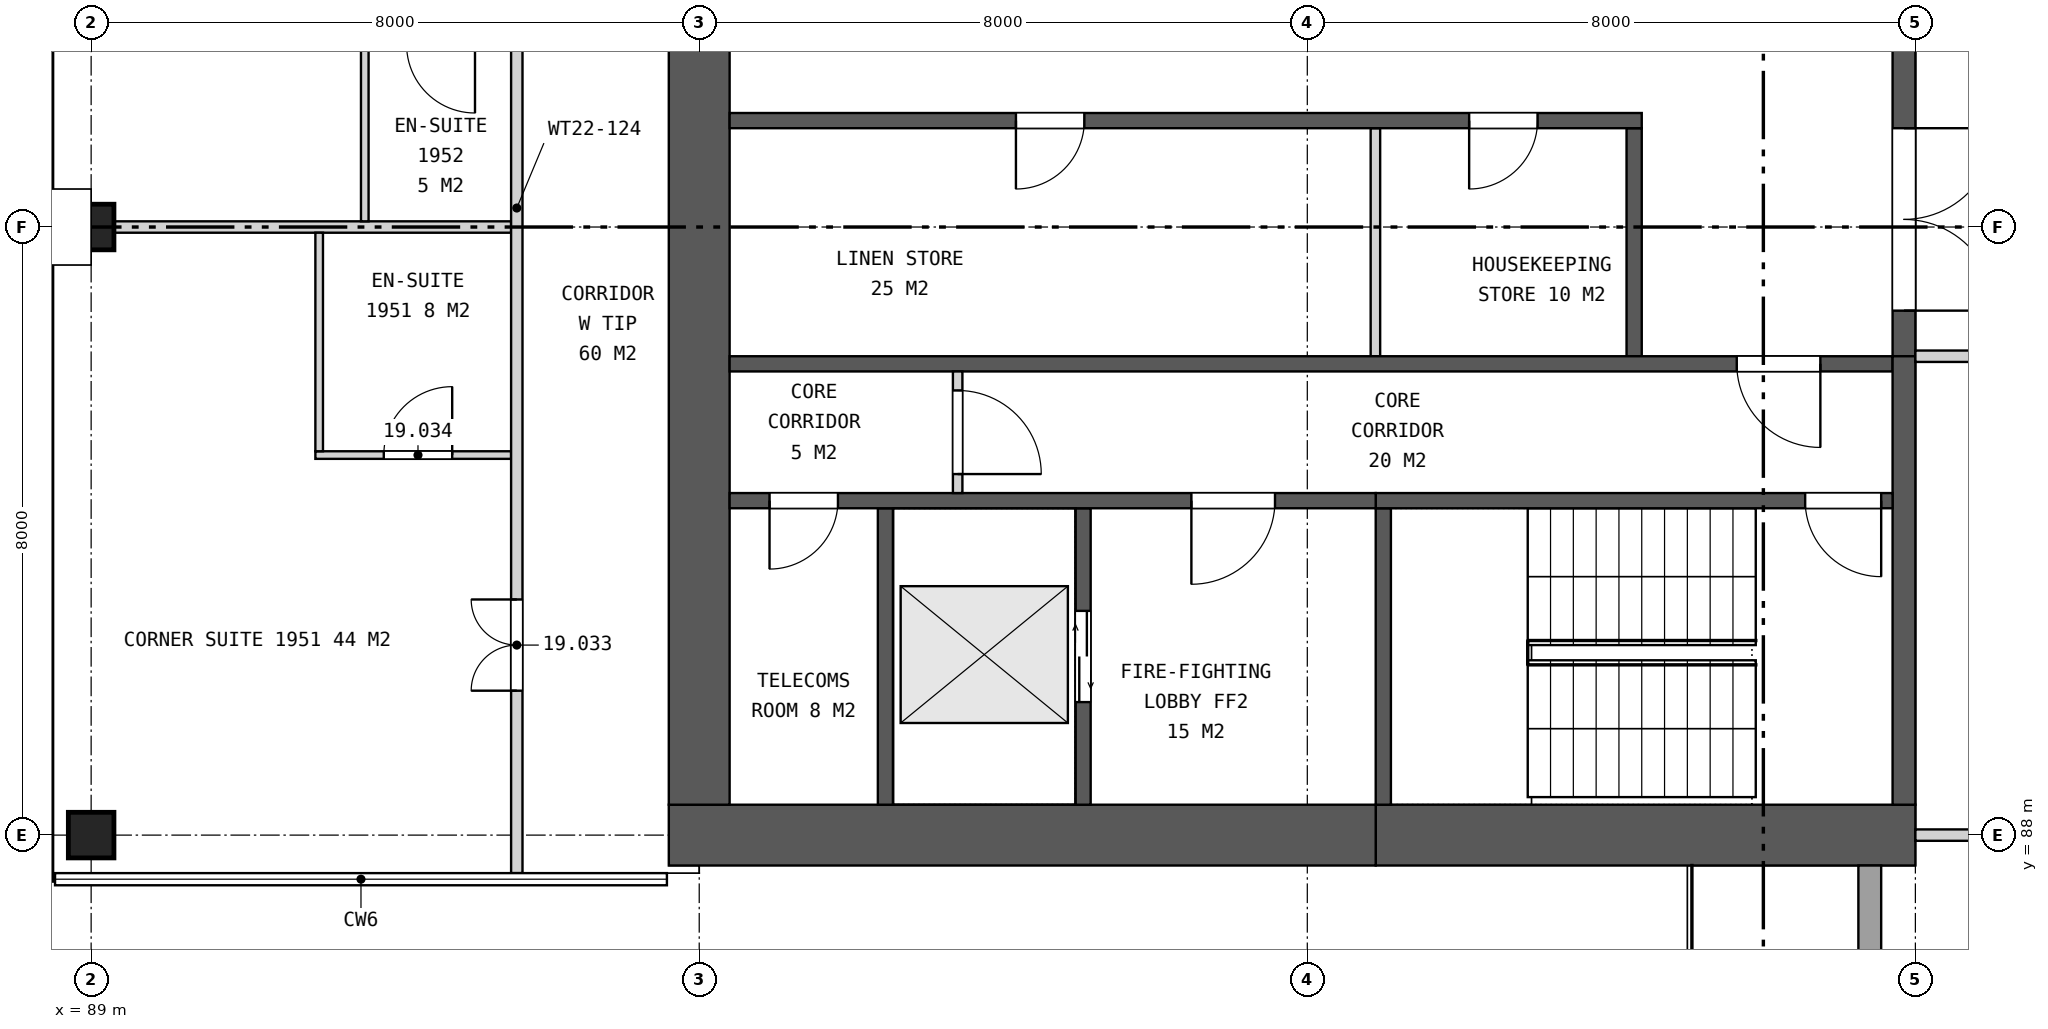
"""IFC4 building model, lengths in metres.
Left out: names, types, materials, properties, quantities, classifications, styles, units other than length and angle.
Written with IfcOpenShell. Run it as: python <this file> out.ifc"""

import sys

from ifc_helpers import new_model, si_unit, direction, frame, frame_2d, origin, origin_2d, place, context, subcontext, project, spatial, rectangle, extrude, element, fill, save


model = new_model("IFC4")
c1 = context("Model", 3, precision=1e-05, world=origin(), true_north=direction((0.0, 1.0)))
c2 = subcontext(c1, "Body", "Model", "MODEL_VIEW")
j1 = project(units=[si_unit("LENGTHUNIT", "METRE"), si_unit("PLANEANGLEUNIT", "RADIAN")], contexts=[c1])
p1 = place(None, origin())
s1 = spatial("IfcSite", under=j1, at=p1, CompositionType="ELEMENT")
p2 = place(p1, origin())
s2 = spatial("IfcBuilding", under=s1, at=p2, CompositionType="ELEMENT")
p3 = place(p2, frame((0.0, 0.0, 97.9)))
s3 = spatial("IfcBuildingStorey", under=s2, at=p3, CompositionType="ELEMENT", Elevation=97.9)
for number, where, z_axis, x_axis in (
    (1, (89.0, 88.0, 0.0), (0.0, 0.0, 1.0), (1.0, 0.0, 0.0)),
    (2, (89.0, 96.0, 0.0), (0.0, 0.0, 1.0), (1.0, 0.0, 0.0)),
):
    element("IfcColumn", number, at=place(p3, frame(where, z_axis=z_axis, x_axis=x_axis)), inside=s3, PredefinedType="COLUMN", context=c2, shape_type="SweptSolid", body=[
        extrude(rectangle(XDim=0.6, YDim=0.6, at=origin_2d()), origin(), (0.0, 0.0, 1.0), 3.7),
    ])
p4 = place(p3, frame((113.0, 88.0, 0.0), z_axis=(0.0, 0.0, 1.0), x_axis=(-1.0, 0.0, 0.0)))
e3 = element("IfcWall", 3, at=p4, inside=s3, PredefinedType="SHEAR", context=c2, shape_type="SweptSolid", body=[
    extrude(rectangle(XDim=7.1, YDim=0.8, at=frame_2d((3.55, 0.0))), origin(), (0.0, 0.0, 1.0), 3.7),
])
p5 = place(p3, frame((105.9, 88.0, 0.0), z_axis=(0.0, 0.0, 1.0), x_axis=(-1.0, 0.0, 0.0)))
e4 = element("IfcWall", 4, at=p5, inside=s3, PredefinedType="SHEAR", context=c2, shape_type="SweptSolid", body=[
    extrude(rectangle(XDim=9.3, YDim=0.8, at=frame_2d((4.65, 0.0))), origin(), (0.0, 0.0, 1.0), 3.7),
])
p6 = place(p3, frame((97.0, 111.6, 0.0), z_axis=(0.0, 0.0, 1.0), x_axis=(0.0, -1.0, 0.0)))
e5 = element("IfcWall", 5, at=p6, inside=s3, PredefinedType="SHEAR", context=c2, shape_type="SweptSolid", body=[
    extrude(rectangle(XDim=23.2, YDim=0.8, at=frame_2d((11.6, 0.0))), origin(), (0.0, 0.0, 1.0), 3.7),
])
p7 = place(p6, frame((10.4, 0.0, 0.0)))
e6 = element("IfcOpeningElement", 6, at=p7, cuts=e5, PredefinedType="OPENING", context=c2, shape_type="SweptSolid", body=[
    extrude(rectangle(XDim=2.4, YDim=2.4, at=frame_2d((1.2, 1.2))), frame((0.0, 0.41, 0.0), z_axis=(0.0, -1.0, 0.0), x_axis=(1.0, 0.0, 0.0)), (0.0, 0.0, 1.0), 0.82),
])
p8 = place(p3, frame((112.85, 105.7, 0.0), z_axis=(0.0, 0.0, 1.0), x_axis=(0.0, -1.0, 0.0)))
e7 = element("IfcWall", 7, at=p8, inside=s3, PredefinedType="SHEAR", context=c2, shape_type="SweptSolid", body=[
    extrude(rectangle(XDim=11.4, YDim=0.3, at=frame_2d((5.7, 0.0))), origin(), (0.0, 0.0, 1.0), 3.7),
])
p9 = place(p8, frame((0.6, 0.0, 0.0)))
e8 = element("IfcOpeningElement", 8, at=p9, cuts=e7, PredefinedType="OPENING", context=c2, shape_type="SweptSolid", body=[
    extrude(rectangle(XDim=2.4, YDim=2.4, at=frame_2d((1.2, 1.2))), frame((0.0, 0.16, 0.0), z_axis=(0.0, -1.0, 0.0), x_axis=(1.0, 0.0, 0.0)), (0.0, 0.0, 1.0), 0.32),
])
p10 = place(p8, frame((4.5, 0.0, 0.0)))
e9 = element("IfcOpeningElement", 9, at=p10, cuts=e7, PredefinedType="OPENING", context=c2, shape_type="SweptSolid", body=[
    extrude(rectangle(XDim=2.4, YDim=2.4, at=frame_2d((1.2, 1.2))), frame((0.0, 0.16, 0.0), z_axis=(0.0, -1.0, 0.0), x_axis=(1.0, 0.0, 0.0)), (0.0, 0.0, 1.0), 0.32),
])
p11 = place(p8, frame((8.4, 0.0, 0.0)))
e10 = element("IfcOpeningElement", 10, at=p11, cuts=e7, PredefinedType="OPENING", context=c2, shape_type="SweptSolid", body=[
    extrude(rectangle(XDim=2.4, YDim=2.4, at=frame_2d((1.2, 1.2))), frame((0.0, 0.16, 0.0), z_axis=(0.0, -1.0, 0.0), x_axis=(1.0, 0.0, 0.0)), (0.0, 0.0, 1.0), 0.32),
])
p12 = place(p3, frame((109.3, 97.3, 0.0), z_axis=(0.0, 0.0, 1.0), x_axis=(0.0, -1.0, 0.0)))
e11 = element("IfcWall", 11, at=p12, inside=s3, PredefinedType="SHEAR", context=c2, shape_type="SweptSolid", body=[
    extrude(rectangle(XDim=3.0, YDim=0.2, at=frame_2d((1.5, 0.0))), origin(), (0.0, 0.0, 1.0), 3.7),
])
p13 = place(p3, frame((105.896, 97.3, 0.0), z_axis=(0.0, 0.0, 1.0), x_axis=(0.0, -1.0, 0.0)))
e12 = element("IfcWall", 12, at=p13, inside=s3, PredefinedType="PARTITIONING", context=c2, shape_type="SweptSolid", body=[
    extrude(rectangle(XDim=3.0, YDim=0.125, at=frame_2d((1.5, 0.0))), origin(), (0.0, 0.0, 1.0), 3.7),
])
p14 = place(p3, frame((109.4, 97.4, 0.0), z_axis=(0.0, 0.0, 1.0), x_axis=(-1.0, 0.0, 0.0)))
e13 = element("IfcWall", 13, at=p14, inside=s3, PredefinedType="SHEAR", context=c2, shape_type="SweptSolid", body=[
    extrude(rectangle(XDim=12.0, YDim=0.2, at=frame_2d((6.0, 0.0))), origin(), (0.0, 0.0, 1.0), 3.7),
])
p15 = place(p14, frame((1.371, 0.0, 0.0)))
e14 = element("IfcOpeningElement", 14, at=p15, cuts=e13, PredefinedType="OPENING", context=c2, shape_type="SweptSolid", body=[
    extrude(rectangle(XDim=0.9, YDim=2.1, at=frame_2d((0.45, 1.05))), frame((0.0, 0.11, 0.0), z_axis=(0.0, -1.0, 0.0), x_axis=(1.0, 0.0, 0.0)), (0.0, 0.0, 1.0), 0.22),
])
p16 = place(p14, frame((7.333, 0.0, 0.0)))
e15 = element("IfcOpeningElement", 15, at=p16, cuts=e13, PredefinedType="OPENING", context=c2, shape_type="SweptSolid", body=[
    extrude(rectangle(XDim=0.9, YDim=2.1, at=frame_2d((0.45, 1.05))), frame((0.0, 0.11, 0.0), z_axis=(0.0, -1.0, 0.0), x_axis=(1.0, 0.0, 0.0)), (0.0, 0.0, 1.0), 0.22),
])
p17 = place(p3, frame((112.7, 94.2, 0.0), z_axis=(0.0, 0.0, 1.0), x_axis=(-1.0, 0.0, 0.0)))
e16 = element("IfcWall", 16, at=p17, inside=s3, PredefinedType="SHEAR", context=c2, shape_type="SweptSolid", body=[
    extrude(rectangle(XDim=15.3, YDim=0.2, at=frame_2d((7.65, 0.0))), origin(), (0.0, 0.0, 1.0), 3.7),
])
p18 = place(p17, frame((0.95, 0.0, 0.0)))
e17 = element("IfcOpeningElement", 17, at=p18, cuts=e16, PredefinedType="OPENING", context=c2, shape_type="SweptSolid", body=[
    extrude(rectangle(XDim=1.1, YDim=2.1, at=frame_2d((0.55, 1.05))), frame((0.0, 0.11, 0.0), z_axis=(0.0, -1.0, 0.0), x_axis=(1.0, 0.0, 0.0)), (0.0, 0.0, 1.0), 0.22),
])
p19 = place(p3, frame((112.85, 94.3, 0.0), z_axis=(0.0, 0.0, 1.0), x_axis=(0.0, -1.0, 0.0)))
e18 = element("IfcWall", 18, at=p19, inside=s3, PredefinedType="SHEAR", context=c2, shape_type="SweptSolid", body=[
    extrude(rectangle(XDim=5.9, YDim=0.3, at=frame_2d((2.95, 0.0))), origin(), (0.0, 0.0, 1.0), 3.7),
])
p20 = place(p3, frame((106.0, 92.3, 0.0), z_axis=(0.0, 0.0, 1.0), x_axis=(0.0, -1.0, 0.0)))
e19 = element("IfcWall", 19, at=p20, inside=s3, PredefinedType="SHEAR", context=c2, shape_type="SweptSolid", body=[
    extrude(rectangle(XDim=3.9, YDim=0.2, at=frame_2d((1.95, 0.0))), origin(), (0.0, 0.0, 1.0), 3.7),
])
p21 = place(p3, frame((102.05, 92.3, 0.0), z_axis=(0.0, 0.0, 1.0), x_axis=(0.0, -1.0, 0.0)))
e20 = element("IfcWall", 20, at=p21, inside=s3, PredefinedType="SHEAR", context=c2, shape_type="SweptSolid", body=[
    extrude(rectangle(XDim=3.9, YDim=0.2, at=frame_2d((1.95, 0.0))), origin(), (0.0, 0.0, 1.0), 3.7),
])
p22 = place(p21, frame((1.35, 0.0, 0.0)))
e21 = element("IfcOpeningElement", 21, at=p22, cuts=e20, PredefinedType="OPENING", context=c2, shape_type="SweptSolid", body=[
    extrude(rectangle(XDim=1.2, YDim=2.1, at=frame_2d((0.6, 1.05))), frame((0.0, 0.11, 0.0), z_axis=(0.0, -1.0, 0.0), x_axis=(1.0, 0.0, 0.0)), (0.0, 0.0, 1.0), 0.22),
])
p23 = place(p3, frame((99.45, 92.3, 0.0), z_axis=(0.0, 0.0, 1.0), x_axis=(0.0, -1.0, 0.0)))
e22 = element("IfcWall", 22, at=p23, inside=s3, PredefinedType="SHEAR", context=c2, shape_type="SweptSolid", body=[
    extrude(rectangle(XDim=3.9, YDim=0.2, at=frame_2d((1.95, 0.0))), origin(), (0.0, 0.0, 1.0), 3.7),
])
p24 = place(p3, frame((112.7, 92.4, 0.0), z_axis=(0.0, 0.0, 1.0), x_axis=(-1.0, 0.0, 0.0)))
e23 = element("IfcWall", 23, at=p24, inside=s3, PredefinedType="SHEAR", context=c2, shape_type="SweptSolid", body=[
    extrude(rectangle(XDim=6.8, YDim=0.2, at=frame_2d((3.4, 0.0))), origin(), (0.0, 0.0, 1.0), 3.7),
])
p25 = place(p24, frame((0.15, 0.0, 0.0)))
e24 = element("IfcOpeningElement", 24, at=p25, cuts=e23, PredefinedType="OPENING", context=c2, shape_type="SweptSolid", body=[
    extrude(rectangle(XDim=1.0, YDim=2.1, at=frame_2d((0.5, 1.05))), frame((0.0, 0.11, 0.0), z_axis=(0.0, -1.0, 0.0), x_axis=(1.0, 0.0, 0.0)), (0.0, 0.0, 1.0), 0.22),
])
p26 = place(p3, frame((105.9, 92.4, 0.0), z_axis=(0.0, 0.0, 1.0), x_axis=(-1.0, 0.0, 0.0)))
e25 = element("IfcWall", 25, at=p26, inside=s3, PredefinedType="SHEAR", context=c2, shape_type="SweptSolid", body=[
    extrude(rectangle(XDim=8.5, YDim=0.2, at=frame_2d((4.25, 0.0))), origin(), (0.0, 0.0, 1.0), 3.7),
])
p27 = place(p26, frame((1.325, 0.0, 0.0)))
e26 = element("IfcOpeningElement", 26, at=p27, cuts=e25, PredefinedType="OPENING", context=c2, shape_type="SweptSolid", body=[
    extrude(rectangle(XDim=1.1, YDim=2.1, at=frame_2d((0.55, 1.05))), frame((0.0, 0.11, 0.0), z_axis=(0.0, -1.0, 0.0), x_axis=(1.0, 0.0, 0.0)), (0.0, 0.0, 1.0), 0.22),
])
p28 = place(p26, frame((7.075, 0.0, 0.0)))
e27 = element("IfcOpeningElement", 27, at=p28, cuts=e25, PredefinedType="OPENING", context=c2, shape_type="SweptSolid", body=[
    extrude(rectangle(XDim=0.9, YDim=2.1, at=frame_2d((0.45, 1.05))), frame((0.0, 0.11, 0.0), z_axis=(0.0, -1.0, 0.0), x_axis=(1.0, 0.0, 0.0)), (0.0, 0.0, 1.0), 0.22),
])
p29 = place(p3, frame((100.4, 94.1, 0.0), z_axis=(0.0, 0.0, 1.0), x_axis=(0.0, -1.0, 0.0)))
e28 = element("IfcWall", 28, at=p29, inside=s3, PredefinedType="PARTITIONING", context=c2, shape_type="SweptSolid", body=[
    extrude(rectangle(XDim=1.6, YDim=0.125, at=frame_2d((0.8, 0.0))), origin(), (0.0, 0.0, 1.0), 3.7),
])
p30 = place(p29, frame((0.25, 0.0, 0.0)))
e29 = element("IfcOpeningElement", 29, at=p30, cuts=e28, PredefinedType="OPENING", context=c2, shape_type="SweptSolid", body=[
    extrude(rectangle(XDim=1.1, YDim=2.1, at=frame_2d((0.55, 1.05))), frame((0.0, 0.073, 0.0), z_axis=(0.0, -1.0, 0.0), x_axis=(1.0, 0.0, 0.0)), (0.0, 0.0, 1.0), 0.145),
])
p31 = place(p3, frame((112.4, 87.6, 0.0), z_axis=(0.0, 0.0, 1.0), x_axis=(0.0, -1.0, 0.0)))
e30 = element("IfcWall", 30, at=p31, inside=s3, PredefinedType="SOLIDWALL", context=c2, shape_type="SweptSolid", body=[
    extrude(rectangle(XDim=7.568, YDim=0.3, at=frame_2d((3.784, 0.0))), origin(), (0.0, 0.0, 1.0), 3.42),
])
p32 = place(p31, frame((2.55, 0.0, 0.0)))
e31 = element("IfcOpeningElement", 31, at=p32, cuts=e30, PredefinedType="OPENING", context=c2, shape_type="SweptSolid", body=[
    extrude(rectangle(XDim=2.1, YDim=2.4, at=frame_2d((1.05, 1.2))), frame((0.0, 0.16, 0.0), z_axis=(0.0, -1.0, 0.0), x_axis=(1.0, 0.0, 0.0)), (0.0, 0.0, 1.0), 0.32),
])
p33 = place(p3, frame((113.0, 88.0, 0.0), z_axis=(0.0, 0.0, 1.0), x_axis=(1.0, 0.0, 0.0)))
e32 = element("IfcWall", 32, at=p33, inside=s3, PredefinedType="PARTITIONING", context=c2, shape_type="SweptSolid", body=[
    extrude(rectangle(XDim=5.525, YDim=0.15, at=frame_2d((2.762, 0.0))), origin(), (0.0, 0.0, 1.0), 2.957),
])
p34 = place(p3, frame((91.95, 93.0, 0.0), z_axis=(0.0, 0.0, 1.0), x_axis=(1.0, 0.0, 0.0)))
e33 = element("IfcWall", 33, at=p34, inside=s3, PredefinedType="PLUMBINGWALL", context=c2, shape_type="SweptSolid", body=[
    extrude(rectangle(XDim=2.575, YDim=0.1, at=frame_2d((1.288, 0.0))), origin(), (0.0, 0.0, 1.0), 3.7),
])
p35 = place(p34, frame((0.9, 0.0, 0.0)))
e34 = element("IfcOpeningElement", 34, at=p35, cuts=e33, PredefinedType="OPENING", context=c2, shape_type="SweptSolid", body=[
    extrude(rectangle(XDim=0.9, YDim=2.1, at=frame_2d((0.45, 1.05))), frame((0.0, 0.06, 0.0), z_axis=(0.0, -1.0, 0.0), x_axis=(1.0, 0.0, 0.0)), (0.0, 0.0, 1.0), 0.12),
])
p36 = place(p3, frame((113.0, 94.3, 0.0), z_axis=(0.0, 0.0, 1.0), x_axis=(1.0, 0.0, 0.0)))
e35 = element("IfcWall", 35, at=p36, inside=s3, PredefinedType="PARTITIONING", context=c2, shape_type="SweptSolid", body=[
    extrude(rectangle(XDim=5.675, YDim=0.15, at=frame_2d((2.837, 0.0))), origin(), (0.0, 0.0, 1.0), 3.7),
])
p37 = place(p3, frame((89.3, 96.0, 0.0), z_axis=(0.0, 0.0, 1.0), x_axis=(1.0, 0.0, 0.0)))
e36 = element("IfcWall", 36, at=p37, inside=s3, PredefinedType="PARTITIONING", context=c2, shape_type="SweptSolid", body=[
    extrude(rectangle(XDim=5.225, YDim=0.15, at=frame_2d((2.612, 0.0))), origin(), (0.0, 0.0, 1.0), 2.957),
])
p38 = place(p3, frame((92.0, 93.05, 0.0), z_axis=(0.0, 0.0, 1.0), x_axis=(0.0, 1.0, 0.0)))
e37 = element("IfcWall", 37, at=p38, inside=s3, PredefinedType="PLUMBINGWALL", context=c2, shape_type="SweptSolid", body=[
    extrude(rectangle(XDim=2.875, YDim=0.1, at=frame_2d((1.438, 0.0))), origin(), (0.0, 0.0, 1.0), 3.7),
])
p39 = place(p3, frame((92.6, 96.075, 0.0), z_axis=(0.0, 0.0, 1.0), x_axis=(0.0, 1.0, 0.0)))
e38 = element("IfcWall", 38, at=p39, inside=s3, PredefinedType="PLUMBINGWALL", context=c2, shape_type="SweptSolid", body=[
    extrude(rectangle(XDim=2.275, YDim=0.1, at=frame_2d((1.138, 0.0))), origin(), (0.0, 0.0, 1.0), 3.7),
])
p40 = place(p3, frame((94.6, 87.5, 0.0), z_axis=(0.0, 0.0, 1.0), x_axis=(0.0, 1.0, 0.0)))
e39 = element("IfcWall", 39, at=p40, inside=s3, PredefinedType="PARTITIONING", context=c2, shape_type="SweptSolid", body=[
    extrude(rectangle(XDim=25.0, YDim=0.15, at=frame_2d((12.5, 0.0))), origin(), (0.0, 0.0, 1.0), 2.957),
])
p41 = place(p40, frame((2.4, 0.0, 0.0)))
e40 = element("IfcOpeningElement", 40, at=p41, cuts=e39, PredefinedType="OPENING", context=c2, shape_type="SweptSolid", body=[
    extrude(rectangle(XDim=1.2, YDim=2.2, at=frame_2d((0.6, 1.1))), frame((0.0, 0.085, 0.0), z_axis=(0.0, -1.0, 0.0), x_axis=(1.0, 0.0, 0.0)), (0.0, 0.0, 1.0), 0.17),
])
p42 = place(p40, frame((11.2, 0.0, 0.0)))
e41 = element("IfcOpeningElement", 41, at=p42, cuts=e39, PredefinedType="OPENING", context=c2, shape_type="SweptSolid", body=[
    extrude(rectangle(XDim=1.0, YDim=2.1, at=frame_2d((0.5, 1.05))), frame((0.0, 0.085, 0.0), z_axis=(0.0, -1.0, 0.0), x_axis=(1.0, 0.0, 0.0)), (0.0, 0.0, 1.0), 0.17),
])
p43 = place(p40, frame((12.8, 0.0, 0.0)))
e42 = element("IfcOpeningElement", 42, at=p43, cuts=e39, PredefinedType="OPENING", context=c2, shape_type="SweptSolid", body=[
    extrude(rectangle(XDim=1.0, YDim=2.1, at=frame_2d((0.5, 1.05))), frame((0.0, 0.085, 0.0), z_axis=(0.0, -1.0, 0.0), x_axis=(1.0, 0.0, 0.0)), (0.0, 0.0, 1.0), 0.17),
])
p44 = place(p40, frame((19.2, 0.0, 0.0)))
e43 = element("IfcOpeningElement", 43, at=p44, cuts=e39, PredefinedType="OPENING", context=c2, shape_type="SweptSolid", body=[
    extrude(rectangle(XDim=1.0, YDim=2.1, at=frame_2d((0.5, 1.05))), frame((0.0, 0.085, 0.0), z_axis=(0.0, -1.0, 0.0), x_axis=(1.0, 0.0, 0.0)), (0.0, 0.0, 1.0), 0.17),
])
p45 = place(p40, frame((20.8, 0.0, 0.0)))
e44 = element("IfcOpeningElement", 44, at=p45, cuts=e39, PredefinedType="OPENING", context=c2, shape_type="SweptSolid", body=[
    extrude(rectangle(XDim=1.0, YDim=2.1, at=frame_2d((0.5, 1.05))), frame((0.0, 0.085, 0.0), z_axis=(0.0, -1.0, 0.0), x_axis=(1.0, 0.0, 0.0)), (0.0, 0.0, 1.0), 0.17),
])
p46 = place(p11, origin())
e45 = element("IfcDoor", 45, at=p46, inside=s3, OperationType="DOUBLE_DOOR_SINGLE_SWING", PredefinedType="DOOR", context=c2, shape_type="SweptSolid", body=[
    extrude(rectangle(XDim=2.4, YDim=2.4, at=frame_2d((1.2, 1.2))), frame((0.0, 0.025, 0.0), z_axis=(0.0, -1.0, 0.0), x_axis=(1.0, 0.0, 0.0)), (0.0, 0.0, 1.0), 0.05),
])
fill(e10, e45)
p47 = place(p15, origin())
e46 = element("IfcDoor", 46, at=p47, inside=s3, OperationType="SINGLE_SWING_RIGHT", PredefinedType="DOOR", context=c2, shape_type="SweptSolid", body=[
    extrude(rectangle(XDim=0.9, YDim=2.1, at=frame_2d((0.45, 1.05))), frame((0.0, 0.025, 0.0), z_axis=(0.0, -1.0, 0.0), x_axis=(1.0, 0.0, 0.0)), (0.0, 0.0, 1.0), 0.05),
])
fill(e14, e46)
p48 = place(p16, origin())
e47 = element("IfcDoor", 47, at=p48, inside=s3, OperationType="SINGLE_SWING_RIGHT", PredefinedType="DOOR", context=c2, shape_type="SweptSolid", body=[
    extrude(rectangle(XDim=0.9, YDim=2.1, at=frame_2d((0.45, 1.05))), frame((0.0, 0.025, 0.0), z_axis=(0.0, -1.0, 0.0), x_axis=(1.0, 0.0, 0.0)), (0.0, 0.0, 1.0), 0.05),
])
fill(e15, e47)
p49 = place(p18, origin())
e48 = element("IfcDoor", 48, at=p49, inside=s3, OperationType="SINGLE_SWING_LEFT", PredefinedType="DOOR", context=c2, shape_type="SweptSolid", body=[
    extrude(rectangle(XDim=1.1, YDim=2.1, at=frame_2d((0.55, 1.05))), frame((0.0, 0.025, 0.0), z_axis=(0.0, -1.0, 0.0), x_axis=(1.0, 0.0, 0.0)), (0.0, 0.0, 1.0), 0.05),
])
fill(e17, e48)
p50 = place(p22, origin())
e49 = element("IfcDoor", 49, at=p50, inside=s3, OperationType="DOUBLE_DOOR_SLIDING", PredefinedType="DOOR", context=c2, shape_type="SweptSolid", body=[
    extrude(rectangle(XDim=1.2, YDim=2.1, at=frame_2d((0.6, 1.05))), frame((0.0, 0.025, 0.0), z_axis=(0.0, -1.0, 0.0), x_axis=(1.0, 0.0, 0.0)), (0.0, 0.0, 1.0), 0.05),
])
fill(e21, e49)
p51 = place(p25, origin())
e50 = element("IfcDoor", 50, at=p51, inside=s3, OperationType="SINGLE_SWING_LEFT", PredefinedType="DOOR", context=c2, shape_type="SweptSolid", body=[
    extrude(rectangle(XDim=1.0, YDim=2.1, at=frame_2d((0.5, 1.05))), frame((0.0, 0.025, 0.0), z_axis=(0.0, -1.0, 0.0), x_axis=(1.0, 0.0, 0.0)), (0.0, 0.0, 1.0), 0.05),
])
fill(e24, e50)
p52 = place(p27, origin())
e51 = element("IfcDoor", 51, at=p52, inside=s3, OperationType="SINGLE_SWING_RIGHT", PredefinedType="DOOR", context=c2, shape_type="SweptSolid", body=[
    extrude(rectangle(XDim=1.1, YDim=2.1, at=frame_2d((0.55, 1.05))), frame((0.0, 0.025, 0.0), z_axis=(0.0, -1.0, 0.0), x_axis=(1.0, 0.0, 0.0)), (0.0, 0.0, 1.0), 0.05),
])
fill(e26, e51)
p53 = place(p28, origin())
e52 = element("IfcDoor", 52, at=p53, inside=s3, OperationType="SINGLE_SWING_RIGHT", PredefinedType="DOOR", context=c2, shape_type="SweptSolid", body=[
    extrude(rectangle(XDim=0.9, YDim=2.1, at=frame_2d((0.45, 1.05))), frame((0.0, 0.025, 0.0), z_axis=(0.0, -1.0, 0.0), x_axis=(1.0, 0.0, 0.0)), (0.0, 0.0, 1.0), 0.05),
])
fill(e27, e52)
p54 = place(p30, origin())
e53 = element("IfcDoor", 53, at=p54, inside=s3, OperationType="SINGLE_SWING_RIGHT", PredefinedType="DOOR", context=c2, shape_type="SweptSolid", body=[
    extrude(rectangle(XDim=1.1, YDim=2.1, at=frame_2d((0.55, 1.05))), frame((0.0, 0.025, 0.0), z_axis=(0.0, -1.0, 0.0), x_axis=(1.0, 0.0, 0.0)), (0.0, 0.0, 1.0), 0.05),
])
fill(e29, e53)
p55 = place(p41, origin())
e54 = element("IfcDoor", 54, at=p55, inside=s3, OperationType="DOUBLE_DOOR_SINGLE_SWING", PredefinedType="DOOR", context=c2, shape_type="SweptSolid", body=[
    extrude(rectangle(XDim=1.2, YDim=2.2, at=frame_2d((0.6, 1.1))), frame((0.0, 0.025, 0.0), z_axis=(0.0, -1.0, 0.0), x_axis=(1.0, 0.0, 0.0)), (0.0, 0.0, 1.0), 0.05),
])
fill(e40, e54)
p56 = place(p35, origin())
e55 = element("IfcDoor", 55, at=p56, inside=s3, OperationType="SINGLE_SWING_RIGHT", PredefinedType="DOOR", context=c2, shape_type="SweptSolid", body=[
    extrude(rectangle(XDim=0.9, YDim=2.1, at=frame_2d((0.45, 1.05))), frame((0.0, 0.025, 0.0), z_axis=(0.0, -1.0, 0.0), x_axis=(1.0, 0.0, 0.0)), (0.0, 0.0, 1.0), 0.05),
])
fill(e34, e55)
save(model, sys.argv[1])
